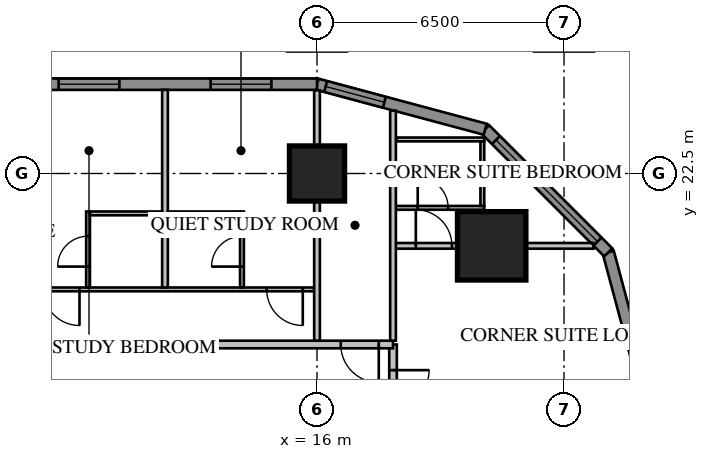
"""IFC4 building model, lengths in metres.
Left out: names, types, materials, properties, quantities, classifications, styles, units other than length and angle.
Written with IfcOpenShell. Run it as: python <this file> out.ifc"""

import sys

from ifc_helpers import new_model, si_unit, direction, frame, frame_2d, origin, origin_2d, place, context, subcontext, project, spatial, rectangle, extrude, element, fill, save


model = new_model("IFC4")
c1 = context("Model", 3, precision=1e-05, world=origin(), true_north=direction((0.0, 1.0)))
c2 = subcontext(c1, "Body", "Model", "MODEL_VIEW")
j1 = project(units=[si_unit("LENGTHUNIT", "METRE"), si_unit("PLANEANGLEUNIT", "RADIAN")], contexts=[c1])
p1 = place(None, origin())
s1 = spatial("IfcSite", under=j1, at=p1, CompositionType="ELEMENT")
p2 = place(p1, origin())
s2 = spatial("IfcBuilding", under=s1, at=p2, CompositionType="ELEMENT")
p3 = place(p2, frame((0.0, 0.0, 31.4)))
s3 = spatial("IfcBuildingStorey", under=s2, at=p3, CompositionType="ELEMENT", Elevation=31.4)
p4 = place(p3, frame((20.596, 20.596, 0.0), z_axis=(0.0, 0.0, 1.0), x_axis=(1.0, 0.0, 0.0)))
e1 = element("IfcColumn", 1, at=p4, inside=s3, PredefinedType="COLUMN", context=c2, shape_type="SweptSolid", body=[
    extrude(rectangle(XDim=1.8, YDim=1.8, at=origin_2d()), origin(), (0.0, 0.0, 1.0), 3.85),
])
p5 = place(p3, frame((16.0, 22.5, 0.0), z_axis=(0.0, 0.0, 1.0), x_axis=(1.0, 0.0, 0.0)))
e2 = element("IfcColumn", 2, at=p5, inside=s3, PredefinedType="COLUMN", context=c2, shape_type="SweptSolid", body=[
    extrude(rectangle(XDim=1.45, YDim=1.45, at=origin_2d()), origin(), (0.0, 0.0, 1.0), 3.85),
])
p6 = place(p3, frame((24.85, 16.0, 0.0), z_axis=(0.0, 0.0, 1.0), x_axis=(-0.258839972501, 0.965920218567, 0.0)))
e3 = element("IfcWall", 3, at=p6, inside=s3, PredefinedType="SOLIDWALL", context=c2, shape_type="SweptSolid", body=[
    extrude(rectangle(XDim=4.581, YDim=0.3, at=frame_2d((2.291, 0.0))), origin(), (0.0, 0.0, 1.0), 3.65),
])
p7 = place(p3, frame((23.664, 20.425, 0.0), z_axis=(0.0, 0.0, 1.0), x_axis=(-0.707106781187, 0.707106781187, 0.0)))
e4 = element("IfcWall", 4, at=p7, inside=s3, PredefinedType="SOLIDWALL", context=c2, shape_type="SweptSolid", body=[
    extrude(rectangle(XDim=4.581, YDim=0.3, at=frame_2d((2.291, 0.0))), origin(), (0.0, 0.0, 1.0), 3.65),
])
p8 = place(p7, frame((0.4, 0.0, 0.75)))
e5 = element("IfcOpeningElement", 5, at=p8, cuts=e4, PredefinedType="OPENING", context=c2, shape_type="SweptSolid", body=[
    extrude(rectangle(XDim=3.781, YDim=1.8, at=frame_2d((1.891, 0.9))), frame((0.0, 0.17, 0.0), z_axis=(0.0, -1.0, 0.0), x_axis=(1.0, 0.0, 0.0)), (0.0, 0.0, 1.0), 0.34),
])
p9 = place(p3, frame((20.425, 23.664, 0.0), z_axis=(0.0, 0.0, 1.0), x_axis=(-0.965920218567, 0.258839972501, 0.0)))
e6 = element("IfcWall", 6, at=p9, inside=s3, PredefinedType="SOLIDWALL", context=c2, shape_type="SweptSolid", body=[
    extrude(rectangle(XDim=4.581, YDim=0.3, at=frame_2d((2.291, 0.0))), origin(), (0.0, 0.0, 1.0), 3.65),
])
p10 = place(p9, frame((2.746, 0.0, 0.75)))
e7 = element("IfcOpeningElement", 7, at=p10, cuts=e6, PredefinedType="OPENING", context=c2, shape_type="SweptSolid", body=[
    extrude(rectangle(XDim=1.6, YDim=1.8, at=frame_2d((0.8, 0.9))), frame((0.0, 0.17, 0.0), z_axis=(0.0, -1.0, 0.0), x_axis=(1.0, 0.0, 0.0)), (0.0, 0.0, 1.0), 0.34),
])
p11 = place(p3, frame((16.0, 24.85, 0.0), z_axis=(0.0, 0.0, 1.0), x_axis=(-1.0, 0.0, 0.0)))
e8 = element("IfcWall", 8, at=p11, inside=s3, PredefinedType="SOLIDWALL", context=c2, shape_type="SweptSolid", body=[
    extrude(rectangle(XDim=32.0, YDim=0.3, at=frame_2d((16.0, 0.0))), origin(), (0.0, 0.0, 1.0), 3.65),
])
p12 = place(p11, frame((1.2, 0.0, 0.75)))
e9 = element("IfcOpeningElement", 9, at=p12, cuts=e8, PredefinedType="OPENING", context=c2, shape_type="SweptSolid", body=[
    extrude(rectangle(XDim=1.6, YDim=1.8, at=frame_2d((0.8, 0.9))), frame((0.0, 0.17, 0.0), z_axis=(0.0, -1.0, 0.0), x_axis=(1.0, 0.0, 0.0)), (0.0, 0.0, 1.0), 0.34),
])
p13 = place(p11, frame((5.2, 0.0, 0.75)))
e10 = element("IfcOpeningElement", 10, at=p13, cuts=e8, PredefinedType="OPENING", context=c2, shape_type="SweptSolid", body=[
    extrude(rectangle(XDim=1.6, YDim=1.8, at=frame_2d((0.8, 0.9))), frame((0.0, 0.17, 0.0), z_axis=(0.0, -1.0, 0.0), x_axis=(1.0, 0.0, 0.0)), (0.0, 0.0, 1.0), 0.34),
])
p14 = place(p11, frame((17.2, 0.0, 0.75)))
e11 = element("IfcOpeningElement", 11, at=p14, cuts=e8, PredefinedType="OPENING", context=c2, shape_type="SweptSolid", body=[
    extrude(rectangle(XDim=1.6, YDim=1.8, at=frame_2d((0.8, 0.9))), frame((0.0, 0.17, 0.0), z_axis=(0.0, -1.0, 0.0), x_axis=(1.0, 0.0, 0.0)), (0.0, 0.0, 1.0), 0.34),
])
p15 = place(p11, frame((21.2, 0.0, 0.75)))
e12 = element("IfcOpeningElement", 12, at=p15, cuts=e8, PredefinedType="OPENING", context=c2, shape_type="SweptSolid", body=[
    extrude(rectangle(XDim=1.6, YDim=1.8, at=frame_2d((0.8, 0.9))), frame((0.0, 0.17, 0.0), z_axis=(0.0, -1.0, 0.0), x_axis=(1.0, 0.0, 0.0)), (0.0, 0.0, 1.0), 0.34),
])
p16 = place(p11, frame((25.2, 0.0, 0.75)))
e13 = element("IfcOpeningElement", 13, at=p16, cuts=e8, PredefinedType="OPENING", context=c2, shape_type="SweptSolid", body=[
    extrude(rectangle(XDim=1.6, YDim=1.8, at=frame_2d((0.8, 0.9))), frame((0.0, 0.17, 0.0), z_axis=(0.0, -1.0, 0.0), x_axis=(1.0, 0.0, 0.0)), (0.0, 0.0, 1.0), 0.34),
])
p17 = place(p11, frame((29.2, 0.0, 0.75)))
e14 = element("IfcOpeningElement", 14, at=p17, cuts=e8, PredefinedType="OPENING", context=c2, shape_type="SweptSolid", body=[
    extrude(rectangle(XDim=1.6, YDim=1.8, at=frame_2d((0.8, 0.9))), frame((0.0, 0.17, 0.0), z_axis=(0.0, -1.0, 0.0), x_axis=(1.0, 0.0, 0.0)), (0.0, 0.0, 1.0), 0.34),
])
p18 = place(p11, frame((8.8, 0.0, 0.75)))
e15 = element("IfcOpeningElement", 15, at=p18, cuts=e8, PredefinedType="OPENING", context=c2, shape_type="SweptSolid", body=[
    extrude(rectangle(XDim=2.4, YDim=1.8, at=frame_2d((1.2, 0.9))), frame((0.0, 0.17, 0.0), z_axis=(0.0, -1.0, 0.0), x_axis=(1.0, 0.0, 0.0)), (0.0, 0.0, 1.0), 0.34),
])
p19 = place(p11, frame((13.812, 0.0, 0.0)))
e16 = element("IfcOpeningElement", 16, at=p19, cuts=e8, PredefinedType="OPENING", context=c2, shape_type="SweptSolid", body=[
    extrude(rectangle(XDim=1.0, YDim=2.4, at=frame_2d((0.5, 1.2))), frame((0.0, 0.17, 0.0), z_axis=(0.0, -1.0, 0.0), x_axis=(1.0, 0.0, 0.0)), (0.0, 0.0, 1.0), 0.34),
])
p20 = place(p3, frame((18.0, -18.0, 0.0), z_axis=(0.0, 0.0, 1.0), x_axis=(0.0, 1.0, 0.0)))
e17 = element("IfcWall", 17, at=p20, inside=s3, PredefinedType="PARTITIONING", context=c2, shape_type="SweptSolid", body=[
    extrude(rectangle(XDim=36.0, YDim=0.2, at=frame_2d((18.0, 0.0))), origin(), (0.0, 0.0, 1.0), 3.65),
])
p21 = place(p20, frame((10.4, 0.0, 0.0)))
e18 = element("IfcOpeningElement", 18, at=p21, cuts=e17, PredefinedType="OPENING", context=c2, shape_type="SweptSolid", body=[
    extrude(rectangle(XDim=1.0, YDim=2.1, at=frame_2d((0.5, 1.05))), frame((0.0, 0.12, 0.0), z_axis=(0.0, -1.0, 0.0), x_axis=(1.0, 0.0, 0.0)), (0.0, 0.0, 1.0), 0.24),
])
p22 = place(p20, frame((0.375, 0.0, 0.0)))
e19 = element("IfcOpeningElement", 19, at=p22, cuts=e17, PredefinedType="OPENING", context=c2, shape_type="SweptSolid", body=[
    extrude(rectangle(XDim=1.0, YDim=2.1, at=frame_2d((0.5, 1.05))), frame((0.0, 0.12, 0.0), z_axis=(0.0, -1.0, 0.0), x_axis=(1.0, 0.0, 0.0)), (0.0, 0.0, 1.0), 0.24),
])
p23 = place(p20, frame((34.375, 0.0, 0.0)))
e20 = element("IfcOpeningElement", 20, at=p23, cuts=e17, PredefinedType="OPENING", context=c2, shape_type="SweptSolid", body=[
    extrude(rectangle(XDim=0.95, YDim=2.1, at=frame_2d((0.475, 1.05))), frame((0.0, 0.12, 0.0), z_axis=(0.0, -1.0, 0.0), x_axis=(1.0, 0.0, 0.0)), (0.0, 0.0, 1.0), 0.24),
])
p24 = place(p3, frame((18.065, 21.596, 0.0), z_axis=(0.0, 0.0, 1.0), x_axis=(1.0, 0.0, 0.0)))
e21 = element("IfcWall", 21, at=p24, inside=s3, PredefinedType="PARTITIONING", context=c2, shape_type="SweptSolid", body=[
    extrude(rectangle(XDim=2.335, YDim=0.1, at=frame_2d((1.167, 0.0))), origin(), (0.0, 0.0, 1.0), 3.65),
])
p25 = place(p24, frame((0.585, 0.0, 0.0)))
e22 = element("IfcOpeningElement", 22, at=p25, cuts=e21, PredefinedType="OPENING", context=c2, shape_type="SweptSolid", body=[
    extrude(rectangle(XDim=0.8, YDim=2.1, at=frame_2d((0.4, 1.05))), frame((0.0, 0.07, 0.0), z_axis=(0.0, -1.0, 0.0), x_axis=(1.0, 0.0, 0.0)), (0.0, 0.0, 1.0), 0.14),
])
p26 = place(p3, frame((20.35, 21.646, 0.0), z_axis=(0.0, 0.0, 1.0), x_axis=(0.0, 1.0, 0.0)))
e23 = element("IfcWall", 23, at=p26, inside=s3, PredefinedType="PARTITIONING", context=c2, shape_type="SweptSolid", body=[
    extrude(rectangle(XDim=1.7, YDim=0.1, at=frame_2d((0.85, 0.0))), origin(), (0.0, 0.0, 1.0), 3.65),
])
p27 = place(p3, frame((18.1, 23.396, 0.0), z_axis=(0.0, 0.0, 1.0), x_axis=(1.0, 0.0, 0.0)))
e24 = element("IfcWall", 24, at=p27, inside=s3, PredefinedType="PARTITIONING", context=c2, shape_type="SweptSolid", body=[
    extrude(rectangle(XDim=2.3, YDim=0.1, at=frame_2d((1.15, 0.0))), origin(), (0.0, 0.0, 1.0), 3.65),
])
p28 = place(p3, frame((18.065, 20.596, 0.0), z_axis=(0.0, 0.0, 1.0), x_axis=(1.0, 0.0, 0.0)))
e25 = element("IfcWall", 25, at=p28, inside=s3, PredefinedType="PARTITIONING", context=c2, shape_type="SweptSolid", body=[
    extrude(rectangle(XDim=5.209, YDim=0.15, at=frame_2d((2.604, 0.0))), origin(), (0.0, 0.0, 1.0), 3.65),
])
p29 = place(p28, frame((0.535, 0.0, 0.0)))
e26 = element("IfcOpeningElement", 26, at=p29, cuts=e25, PredefinedType="OPENING", context=c2, shape_type="SweptSolid", body=[
    extrude(rectangle(XDim=0.95, YDim=2.1, at=frame_2d((0.475, 1.05))), frame((0.0, 0.095, 0.0), z_axis=(0.0, -1.0, 0.0), x_axis=(1.0, 0.0, 0.0)), (0.0, 0.0, 1.0), 0.19),
])
p30 = place(p3, frame((18.0, 18.0, 0.0), z_axis=(0.0, 0.0, 1.0), x_axis=(-1.0, 0.0, 0.0)))
e27 = element("IfcWall", 27, at=p30, inside=s3, PredefinedType="PARTITIONING", context=c2, shape_type="SweptSolid", body=[
    extrude(rectangle(XDim=36.0, YDim=0.2, at=frame_2d((18.0, 0.0))), origin(), (0.0, 0.0, 1.0), 3.65),
])
p31 = place(p30, frame((10.4, 0.0, 0.0)))
e28 = element("IfcOpeningElement", 28, at=p31, cuts=e27, PredefinedType="OPENING", context=c2, shape_type="SweptSolid", body=[
    extrude(rectangle(XDim=1.0, YDim=2.1, at=frame_2d((0.5, 1.05))), frame((0.0, 0.12, 0.0), z_axis=(0.0, -1.0, 0.0), x_axis=(1.0, 0.0, 0.0)), (0.0, 0.0, 1.0), 0.24),
])
p32 = place(p30, frame((0.375, 0.0, 0.0)))
e29 = element("IfcOpeningElement", 29, at=p32, cuts=e27, PredefinedType="OPENING", context=c2, shape_type="SweptSolid", body=[
    extrude(rectangle(XDim=1.0, YDim=2.1, at=frame_2d((0.5, 1.05))), frame((0.0, 0.12, 0.0), z_axis=(0.0, -1.0, 0.0), x_axis=(1.0, 0.0, 0.0)), (0.0, 0.0, 1.0), 0.24),
])
p33 = place(p30, frame((34.375, 0.0, 0.0)))
e30 = element("IfcOpeningElement", 30, at=p33, cuts=e27, PredefinedType="OPENING", context=c2, shape_type="SweptSolid", body=[
    extrude(rectangle(XDim=0.95, YDim=2.1, at=frame_2d((0.475, 1.05))), frame((0.0, 0.12, 0.0), z_axis=(0.0, -1.0, 0.0), x_axis=(1.0, 0.0, 0.0)), (0.0, 0.0, 1.0), 0.24),
])
p34 = place(p3, frame((15.925, 19.45, 0.0), z_axis=(0.0, 0.0, 1.0), x_axis=(-1.0, 0.0, 0.0)))
e31 = element("IfcWall", 31, at=p34, inside=s3, PredefinedType="PARTITIONING", context=c2, shape_type="SweptSolid", body=[
    extrude(rectangle(XDim=31.85, YDim=0.1, at=frame_2d((15.925, 0.0))), origin(), (0.0, 0.0, 1.0), 3.65),
])
p35 = place(p34, frame((10.125, 0.0, 0.0)))
e32 = element("IfcOpeningElement", 32, at=p35, cuts=e31, PredefinedType="OPENING", context=c2, shape_type="SweptSolid", body=[
    extrude(rectangle(XDim=1.0, YDim=2.1, at=frame_2d((0.5, 1.05))), frame((0.0, 0.07, 0.0), z_axis=(0.0, -1.0, 0.0), x_axis=(1.0, 0.0, 0.0)), (0.0, 0.0, 1.0), 0.14),
])
p36 = place(p34, frame((8.3, 0.0, 0.0)))
e33 = element("IfcOpeningElement", 33, at=p36, cuts=e31, PredefinedType="OPENING", context=c2, shape_type="SweptSolid", body=[
    extrude(rectangle(XDim=0.8, YDim=2.1, at=frame_2d((0.4, 1.05))), frame((0.0, 0.07, 0.0), z_axis=(0.0, -1.0, 0.0), x_axis=(1.0, 0.0, 0.0)), (0.0, 0.0, 1.0), 0.14),
])
p37 = place(p34, frame((0.3, 0.0, 0.0)))
e34 = element("IfcOpeningElement", 34, at=p37, cuts=e31, PredefinedType="OPENING", context=c2, shape_type="SweptSolid", body=[
    extrude(rectangle(XDim=0.95, YDim=2.1, at=frame_2d((0.475, 1.05))), frame((0.0, 0.07, 0.0), z_axis=(0.0, -1.0, 0.0), x_axis=(1.0, 0.0, 0.0)), (0.0, 0.0, 1.0), 0.14),
])
p38 = place(p34, frame((6.175, 0.0, 0.0)))
e35 = element("IfcOpeningElement", 35, at=p38, cuts=e31, PredefinedType="OPENING", context=c2, shape_type="SweptSolid", body=[
    extrude(rectangle(XDim=0.95, YDim=2.1, at=frame_2d((0.475, 1.05))), frame((0.0, 0.07, 0.0), z_axis=(0.0, -1.0, 0.0), x_axis=(1.0, 0.0, 0.0)), (0.0, 0.0, 1.0), 0.14),
])
p39 = place(p34, frame((16.3, 0.0, 0.0)))
e36 = element("IfcOpeningElement", 36, at=p39, cuts=e31, PredefinedType="OPENING", context=c2, shape_type="SweptSolid", body=[
    extrude(rectangle(XDim=0.95, YDim=2.1, at=frame_2d((0.475, 1.05))), frame((0.0, 0.07, 0.0), z_axis=(0.0, -1.0, 0.0), x_axis=(1.0, 0.0, 0.0)), (0.0, 0.0, 1.0), 0.14),
])
p40 = place(p34, frame((22.175, 0.0, 0.0)))
e37 = element("IfcOpeningElement", 37, at=p40, cuts=e31, PredefinedType="OPENING", context=c2, shape_type="SweptSolid", body=[
    extrude(rectangle(XDim=0.95, YDim=2.1, at=frame_2d((0.475, 1.05))), frame((0.0, 0.07, 0.0), z_axis=(0.0, -1.0, 0.0), x_axis=(1.0, 0.0, 0.0)), (0.0, 0.0, 1.0), 0.14),
])
p41 = place(p34, frame((24.3, 0.0, 0.0)))
e38 = element("IfcOpeningElement", 38, at=p41, cuts=e31, PredefinedType="OPENING", context=c2, shape_type="SweptSolid", body=[
    extrude(rectangle(XDim=0.95, YDim=2.1, at=frame_2d((0.475, 1.05))), frame((0.0, 0.07, 0.0), z_axis=(0.0, -1.0, 0.0), x_axis=(1.0, 0.0, 0.0)), (0.0, 0.0, 1.0), 0.14),
])
p42 = place(p34, frame((30.175, 0.0, 0.0)))
e39 = element("IfcOpeningElement", 39, at=p42, cuts=e31, PredefinedType="OPENING", context=c2, shape_type="SweptSolid", body=[
    extrude(rectangle(XDim=0.95, YDim=2.1, at=frame_2d((0.475, 1.05))), frame((0.0, 0.07, 0.0), z_axis=(0.0, -1.0, 0.0), x_axis=(1.0, 0.0, 0.0)), (0.0, 0.0, 1.0), 0.14),
])
p43 = place(p3, frame((18.0, 18.1, 0.0), z_axis=(0.0, 0.0, 1.0), x_axis=(0.0, 1.0, 0.0)))
e40 = element("IfcWall", 40, at=p43, inside=s3, PredefinedType="PARTITIONING", context=c2, shape_type="SweptSolid", body=[
    extrude(rectangle(XDim=6.053, YDim=0.15, at=frame_2d((3.027, 0.0))), origin(), (0.0, 0.0, 1.0), 3.65),
])
p44 = place(p3, frame((16.0, 18.1, 0.0), z_axis=(0.0, 0.0, 1.0), x_axis=(0.0, 1.0, 0.0)))
e41 = element("IfcWall", 41, at=p44, inside=s3, PredefinedType="PARTITIONING", context=c2, shape_type="SweptSolid", body=[
    extrude(rectangle(XDim=6.589, YDim=0.15, at=frame_2d((3.295, 0.0))), origin(), (0.0, 0.0, 1.0), 3.65),
])
p45 = place(p3, frame((12.0, 19.5, 0.0), z_axis=(0.0, 0.0, 1.0), x_axis=(0.0, 1.0, 0.0)))
e42 = element("IfcWall", 42, at=p45, inside=s3, PredefinedType="PARTITIONING", context=c2, shape_type="SweptSolid", body=[
    extrude(rectangle(XDim=5.2, YDim=0.15, at=frame_2d((2.6, 0.0))), origin(), (0.0, 0.0, 1.0), 3.65),
])
p46 = place(p3, frame((14.025, 19.5, 0.0), z_axis=(0.0, 0.0, 1.0), x_axis=(0.0, 1.0, 0.0)))
e43 = element("IfcWall", 43, at=p46, inside=s3, PredefinedType="PARTITIONING", context=c2, shape_type="SweptSolid", body=[
    extrude(rectangle(XDim=2.0, YDim=0.1, at=frame_2d((1.0, 0.0))), origin(), (0.0, 0.0, 1.0), 3.65),
])
p47 = place(p46, frame((0.55, 0.0, 0.0)))
e44 = element("IfcOpeningElement", 44, at=p47, cuts=e43, PredefinedType="OPENING", context=c2, shape_type="SweptSolid", body=[
    extrude(rectangle(XDim=0.8, YDim=2.1, at=frame_2d((0.4, 1.05))), frame((0.0, 0.07, 0.0), z_axis=(0.0, -1.0, 0.0), x_axis=(1.0, 0.0, 0.0)), (0.0, 0.0, 1.0), 0.14),
])
p48 = place(p3, frame((13.975, 21.45, 0.0), z_axis=(0.0, 0.0, 1.0), x_axis=(-1.0, 0.0, 0.0)))
e45 = element("IfcWall", 45, at=p48, inside=s3, PredefinedType="PARTITIONING", context=c2, shape_type="SweptSolid", body=[
    extrude(rectangle(XDim=1.9, YDim=0.1, at=frame_2d((0.95, 0.0))), origin(), (0.0, 0.0, 1.0), 3.65),
])
p49 = place(p3, frame((9.975, 19.5, 0.0), z_axis=(0.0, 0.0, 1.0), x_axis=(0.0, 1.0, 0.0)))
e46 = element("IfcWall", 46, at=p49, inside=s3, PredefinedType="PARTITIONING", context=c2, shape_type="SweptSolid", body=[
    extrude(rectangle(XDim=2.0, YDim=0.1, at=frame_2d((1.0, 0.0))), origin(), (0.0, 0.0, 1.0), 3.65),
])
p50 = place(p49, frame((0.55, 0.0, 0.0)))
e47 = element("IfcOpeningElement", 47, at=p50, cuts=e46, PredefinedType="OPENING", context=c2, shape_type="SweptSolid", body=[
    extrude(rectangle(XDim=0.8, YDim=2.1, at=frame_2d((0.4, 1.05))), frame((0.0, 0.07, 0.0), z_axis=(0.0, -1.0, 0.0), x_axis=(1.0, 0.0, 0.0)), (0.0, 0.0, 1.0), 0.14),
])
p51 = place(p3, frame((11.925, 21.45, 0.0), z_axis=(0.0, 0.0, 1.0), x_axis=(-1.0, 0.0, 0.0)))
e48 = element("IfcWall", 48, at=p51, inside=s3, PredefinedType="PARTITIONING", context=c2, shape_type="SweptSolid", body=[
    extrude(rectangle(XDim=1.9, YDim=0.1, at=frame_2d((0.95, 0.0))), origin(), (0.0, 0.0, 1.0), 3.65),
])
p52 = place(p8, origin())
e49 = element("IfcWindow", 49, at=p52, inside=s3, PartitioningType="SINGLE_PANEL", PredefinedType="WINDOW", context=c2, shape_type="SweptSolid", body=[
    extrude(rectangle(XDim=3.781, YDim=1.8, at=frame_2d((1.891, 0.9))), frame((0.0, 0.03, 0.0), z_axis=(0.0, -1.0, 0.0), x_axis=(1.0, 0.0, 0.0)), (0.0, 0.0, 1.0), 0.06),
])
fill(e5, e49)
p53 = place(p10, origin())
e50 = element("IfcWindow", 50, at=p53, inside=s3, PartitioningType="SINGLE_PANEL", PredefinedType="WINDOW", context=c2, shape_type="SweptSolid", body=[
    extrude(rectangle(XDim=1.6, YDim=1.8, at=frame_2d((0.8, 0.9))), frame((0.0, 0.03, 0.0), z_axis=(0.0, -1.0, 0.0), x_axis=(1.0, 0.0, 0.0)), (0.0, 0.0, 1.0), 0.06),
])
fill(e7, e50)
p54 = place(p12, origin())
e51 = element("IfcWindow", 51, at=p54, inside=s3, PartitioningType="SINGLE_PANEL", PredefinedType="WINDOW", context=c2, shape_type="SweptSolid", body=[
    extrude(rectangle(XDim=1.6, YDim=1.8, at=frame_2d((0.8, 0.9))), frame((0.0, 0.03, 0.0), z_axis=(0.0, -1.0, 0.0), x_axis=(1.0, 0.0, 0.0)), (0.0, 0.0, 1.0), 0.06),
])
fill(e9, e51)
p55 = place(p13, origin())
e52 = element("IfcWindow", 52, at=p55, inside=s3, PartitioningType="SINGLE_PANEL", PredefinedType="WINDOW", context=c2, shape_type="SweptSolid", body=[
    extrude(rectangle(XDim=1.6, YDim=1.8, at=frame_2d((0.8, 0.9))), frame((0.0, 0.03, 0.0), z_axis=(0.0, -1.0, 0.0), x_axis=(1.0, 0.0, 0.0)), (0.0, 0.0, 1.0), 0.06),
])
fill(e10, e52)
p56 = place(p23, origin())
e53 = element("IfcDoor", 53, at=p56, inside=s3, OperationType="SINGLE_SWING_RIGHT", PredefinedType="DOOR", context=c2, shape_type="SweptSolid", body=[
    extrude(rectangle(XDim=0.95, YDim=2.1, at=frame_2d((0.475, 1.05))), frame((0.0, 0.025, 0.0), z_axis=(0.0, -1.0, 0.0), x_axis=(1.0, 0.0, 0.0)), (0.0, 0.0, 1.0), 0.05),
])
fill(e20, e53)
p57 = place(p25, origin())
e54 = element("IfcDoor", 54, at=p57, inside=s3, OperationType="SINGLE_SWING_LEFT", PredefinedType="DOOR", context=c2, shape_type="SweptSolid", body=[
    extrude(rectangle(XDim=0.8, YDim=2.1, at=frame_2d((0.4, 1.05))), frame((0.0, 0.025, 0.0), z_axis=(0.0, -1.0, 0.0), x_axis=(1.0, 0.0, 0.0)), (0.0, 0.0, 1.0), 0.05),
])
fill(e22, e54)
p58 = place(p29, origin())
e55 = element("IfcDoor", 55, at=p58, inside=s3, OperationType="SINGLE_SWING_LEFT", PredefinedType="DOOR", context=c2, shape_type="SweptSolid", body=[
    extrude(rectangle(XDim=0.95, YDim=2.1, at=frame_2d((0.475, 1.05))), frame((0.0, 0.025, 0.0), z_axis=(0.0, -1.0, 0.0), x_axis=(1.0, 0.0, 0.0)), (0.0, 0.0, 1.0), 0.05),
])
fill(e26, e55)
p59 = place(p32, origin())
e56 = element("IfcDoor", 56, at=p59, inside=s3, OperationType="SINGLE_SWING_LEFT", PredefinedType="DOOR", context=c2, shape_type="SweptSolid", body=[
    extrude(rectangle(XDim=1.0, YDim=2.1, at=frame_2d((0.5, 1.05))), frame((0.0, 0.025, 0.0), z_axis=(0.0, -1.0, 0.0), x_axis=(1.0, 0.0, 0.0)), (0.0, 0.0, 1.0), 0.05),
])
fill(e29, e56)
p60 = place(p37, origin())
e57 = element("IfcDoor", 57, at=p60, inside=s3, OperationType="SINGLE_SWING_LEFT", PredefinedType="DOOR", context=c2, shape_type="SweptSolid", body=[
    extrude(rectangle(XDim=0.95, YDim=2.1, at=frame_2d((0.475, 1.05))), frame((0.0, 0.025, 0.0), z_axis=(0.0, -1.0, 0.0), x_axis=(1.0, 0.0, 0.0)), (0.0, 0.0, 1.0), 0.05),
])
fill(e34, e57)
p61 = place(p47, origin())
e58 = element("IfcDoor", 58, at=p61, inside=s3, OperationType="SINGLE_SWING_LEFT", PredefinedType="DOOR", context=c2, shape_type="SweptSolid", body=[
    extrude(rectangle(XDim=0.8, YDim=2.1, at=frame_2d((0.4, 1.05))), frame((0.0, 0.025, 0.0), z_axis=(0.0, -1.0, 0.0), x_axis=(1.0, 0.0, 0.0)), (0.0, 0.0, 1.0), 0.05),
])
fill(e44, e58)
p62 = place(p38, origin())
e59 = element("IfcDoor", 59, at=p62, inside=s3, OperationType="SINGLE_SWING_LEFT", PredefinedType="DOOR", context=c2, shape_type="SweptSolid", body=[
    extrude(rectangle(XDim=0.95, YDim=2.1, at=frame_2d((0.475, 1.05))), frame((0.0, 0.025, 0.0), z_axis=(0.0, -1.0, 0.0), x_axis=(1.0, 0.0, 0.0)), (0.0, 0.0, 1.0), 0.05),
])
fill(e35, e59)
p63 = place(p50, origin())
e60 = element("IfcDoor", 60, at=p63, inside=s3, OperationType="SINGLE_SWING_LEFT", PredefinedType="DOOR", context=c2, shape_type="SweptSolid", body=[
    extrude(rectangle(XDim=0.8, YDim=2.1, at=frame_2d((0.4, 1.05))), frame((0.0, 0.025, 0.0), z_axis=(0.0, -1.0, 0.0), x_axis=(1.0, 0.0, 0.0)), (0.0, 0.0, 1.0), 0.05),
])
fill(e47, e60)
save(model, sys.argv[1])
